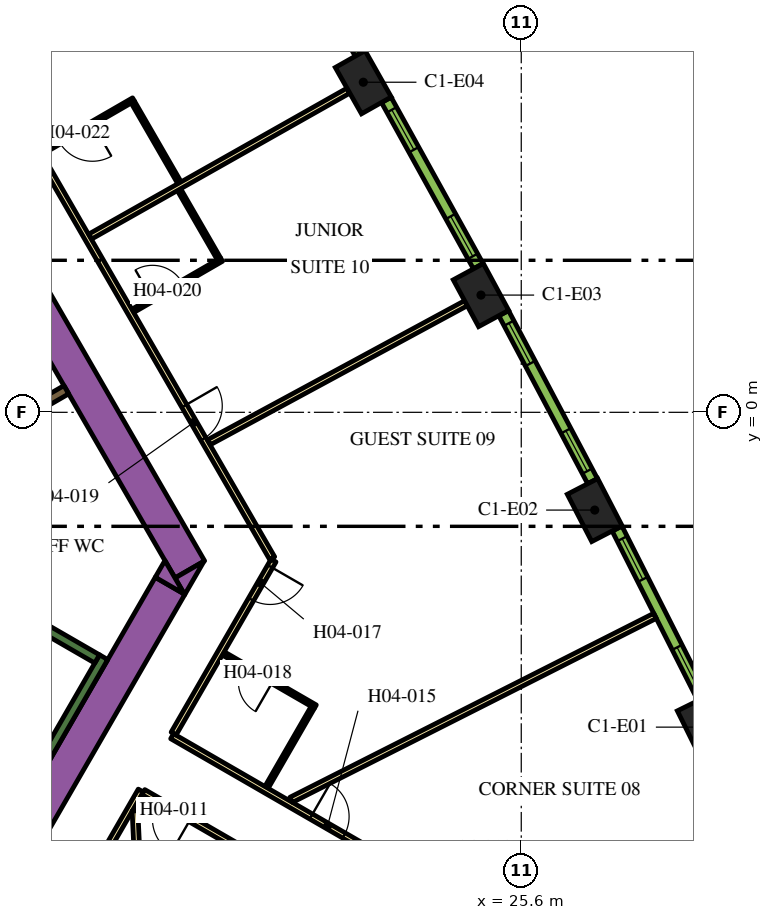
"""IFC4 building model, lengths in metres.
Left out: names, types, materials, properties, quantities, classifications, styles, units other than length and angle.
Written with IfcOpenShell. Run it as: python <this file> out.ifc"""

import sys

from ifc_helpers import new_model, si_unit, direction, frame, frame_2d, origin, origin_2d, place, context, subcontext, project, spatial, polyline, rectangle, outline, extrude, element, fill, save


model = new_model("IFC4")
c1 = context("Model", 3, precision=1e-05, world=origin(), true_north=direction((0.0, 1.0)))
c2 = subcontext(c1, "Body", "Model", "MODEL_VIEW")
j1 = project(units=[si_unit("LENGTHUNIT", "METRE"), si_unit("PLANEANGLEUNIT", "RADIAN")], contexts=[c1])
p1 = place(None, origin())
s1 = spatial("IfcSite", under=j1, at=p1, CompositionType="ELEMENT")
p2 = place(p1, origin())
s2 = spatial("IfcBuilding", under=s1, at=p2, CompositionType="ELEMENT")
p3 = place(p2, frame((0.0, 0.0, 66.6)))
s3 = spatial("IfcBuildingStorey", under=s2, at=p3, CompositionType="ELEMENT", Elevation=66.6)
for number, where, z_axis, x_axis in (
    (1, (30.421, -8.284, 0.0), (0.0, 0.0, 1.0), (-0.443, 0.897, 0.0)),
    (2, (27.533, -2.572, 0.0), (0.0, 0.0, 1.0), (-0.459, 0.888, 0.0)),
    (3, (24.54, 3.085, 0.0), (0.0, 0.0, 1.0), (-0.476, 0.88, 0.0)),
    (4, (21.443, 8.685, 0.0), (0.0, 0.0, 1.0), (-0.492, 0.871, 0.0)),
):
    element("IfcColumn", number, at=place(p3, frame(where, z_axis=z_axis, x_axis=x_axis)), inside=s3, PredefinedType="COLUMN", context=c2, shape_type="SweptSolid", body=[
        extrude(rectangle(XDim=1.4, YDim=0.9, at=origin_2d()), origin(), (0.0, 0.0, 1.0), 3.9),
    ])
p4 = place(p3, frame((6.461, 13.909, 0.0), z_axis=(0.0, 0.0, 1.0), x_axis=(0.500005804227, -0.866022052686, 0.0)))
e5 = element("IfcWall", 5, at=p4, inside=s3, PredefinedType="SOLIDWALL", context=c2, shape_type="SweptSolid", body=[
    extrude(rectangle(XDim=20.834, YDim=0.9, at=frame_2d((10.417, 0.0))), origin(), (0.0, 0.0, 1.0), 3.9),
])
p5 = place(p3, origin())
e6 = element("IfcWall", 6, at=p5, inside=s3, PredefinedType="SOLIDWALL", context=c2, shape_type="SweptSolid", body=[
    extrude(outline(polyline([(16.743, -4.8), (16.489, -4.36), (17.251, -3.92), (16.743, -4.8)])), origin(), (0.0, 0.0, 1.0), 3.9),
])
p6 = place(p3, frame((11.695, -12.644, 0.0), z_axis=(0.0, 0.0, 1.0), x_axis=(0.500010229568, 0.86601949766, 0.0)))
e7 = element("IfcWall", 7, at=p6, inside=s3, PredefinedType="SOLIDWALL", context=c2, shape_type="SweptSolid", body=[
    extrude(rectangle(XDim=9.326, YDim=0.9, at=frame_2d((4.663, 0.0))), origin(), (0.0, 0.0, 1.0), 3.9),
])
e8 = element("IfcWall", 8, at=p5, inside=s3, PredefinedType="SOLIDWALL", context=c2, shape_type="SweptSolid", body=[
    extrude(outline(polyline([(16.223, -3.9), (16.732, -4.78), (15.969, -4.34), (16.223, -3.9)])), origin(), (0.0, 0.0, 1.0), 3.9),
])
p7 = place(p3, frame((12.885, -9.431, 0.0), z_axis=(0.0, 0.0, 1.0), x_axis=(0.500020560727, 0.866013532718, 0.0)))
e9 = element("IfcWall", 9, at=p7, inside=s3, PredefinedType="SOLIDWALL", context=c2, shape_type="SweptSolid", body=[
    extrude(rectangle(XDim=3.45, YDim=0.25, at=frame_2d((1.725, 0.0))), origin(), (0.0, 0.0, 1.0), 3.9),
])
p8 = place(p3, frame((8.334, -2.964, 0.0), z_axis=(0.0, 0.0, 1.0), x_axis=(0.866016039709, -0.500016218704, 0.0)))
e10 = element("IfcWall", 10, at=p8, inside=s3, PredefinedType="SOLIDWALL", context=c2, shape_type="SweptSolid", body=[
    extrude(rectangle(XDim=7.05, YDim=0.25, at=frame_2d((3.525, 0.0))), origin(), (0.0, 0.0, 1.0), 3.9),
])
p9 = place(p3, frame((13.629, 0.594, 0.0), z_axis=(0.0, 0.0, 1.0), x_axis=(-0.86602790099, -0.499995674689, 0.0)))
e11 = element("IfcWall", 11, at=p9, inside=s3, PredefinedType="SOLIDWALL", context=c2, shape_type="SweptSolid", body=[
    extrude(rectangle(XDim=3.146, YDim=0.25, at=frame_2d((1.573, 0.0))), origin(), (0.0, 0.0, 1.0), 3.9),
])
p10 = place(p3, frame((16.412, -8.523, 0.0), z_axis=(0.0, 0.0, 1.0), x_axis=(0.866022197818, -0.500005552856, 0.0)))
e12 = element("IfcWall", 12, at=p10, inside=s3, PredefinedType="PARTITIONING", context=c2, shape_type="SweptSolid", body=[
    extrude(rectangle(XDim=16.224, YDim=0.15, at=frame_2d((8.112, 0.0))), origin(), (0.0, 0.0, 1.0), 2.75),
])
p11 = place(p10, frame((4.223, 0.0, 0.0)))
e13 = element("IfcOpeningElement", 13, at=p11, cuts=e12, PredefinedType="OPENING", context=c2, shape_type="SweptSolid", body=[
    extrude(rectangle(XDim=1.0, YDim=2.1, at=frame_2d((0.5, 1.05))), frame((0.0, 0.085, 0.0), z_axis=(0.0, -1.0, 0.0), x_axis=(1.0, 0.0, 0.0)), (0.0, 0.0, 1.0), 0.17),
])
p12 = place(p3, frame((19.081, -3.9, 0.0), z_axis=(0.0, 0.0, 1.0), x_axis=(-0.499974327079, -0.866040225545, 0.0)))
e14 = element("IfcWall", 14, at=p12, inside=s3, PredefinedType="PARTITIONING", context=c2, shape_type="SweptSolid", body=[
    extrude(rectangle(XDim=5.258, YDim=0.15, at=frame_2d((2.629, 0.0))), origin(), (0.0, 0.0, 1.0), 2.75),
])
p13 = place(p12, frame((0.18, 0.0, 0.0)))
e15 = element("IfcOpeningElement", 15, at=p13, cuts=e14, PredefinedType="OPENING", context=c2, shape_type="SweptSolid", body=[
    extrude(rectangle(XDim=1.0, YDim=2.1, at=frame_2d((0.5, 1.05))), frame((0.0, 0.085, 0.0), z_axis=(0.0, -1.0, 0.0), x_axis=(1.0, 0.0, 0.0)), (0.0, 0.0, 1.0), 0.17),
])
p14 = place(p3, frame((6.163, 18.475, 0.0), z_axis=(0.0, 0.0, 1.0), x_axis=(0.500001317485, -0.866024643133, 0.0)))
e16 = element("IfcWall", 16, at=p14, inside=s3, PredefinedType="PARTITIONING", context=c2, shape_type="SweptSolid", body=[
    extrude(rectangle(XDim=25.767, YDim=0.15, at=frame_2d((12.883, 0.0))), origin(), (0.0, 0.0, 1.0), 2.75),
])
p15 = place(p14, frame((21.138, 0.0, 0.0)))
e17 = element("IfcOpeningElement", 17, at=p15, cuts=e16, PredefinedType="OPENING", context=c2, shape_type="SweptSolid", body=[
    extrude(rectangle(XDim=1.0, YDim=2.1, at=frame_2d((0.5, 1.05))), frame((0.0, 0.085, 0.0), z_axis=(0.0, -1.0, 0.0), x_axis=(1.0, 0.0, 0.0)), (0.0, 0.0, 1.0), 0.17),
])
p16 = place(p14, frame((9.948, 0.0, 0.0)))
e18 = element("IfcOpeningElement", 18, at=p16, cuts=e16, PredefinedType="OPENING", context=c2, shape_type="SweptSolid", body=[
    extrude(rectangle(XDim=1.1, YDim=2.1, at=frame_2d((0.55, 1.05))), frame((0.0, 0.085, 0.0), z_axis=(0.0, -1.0, 0.0), x_axis=(1.0, 0.0, 0.0)), (0.0, 0.0, 1.0), 0.17),
])
p17 = place(p14, frame((8.641, 0.0, 0.0)))
e19 = element("IfcOpeningElement", 19, at=p17, cuts=e16, PredefinedType="OPENING", context=c2, shape_type="SweptSolid", body=[
    extrude(rectangle(XDim=1.0, YDim=2.1, at=frame_2d((0.5, 1.05))), frame((0.0, 0.085, 0.0), z_axis=(0.0, -1.0, 0.0), x_axis=(1.0, 0.0, 0.0)), (0.0, 0.0, 1.0), 0.17),
])
p18 = place(p14, frame((0.18, 0.0, 0.0)))
e20 = element("IfcOpeningElement", 20, at=p18, cuts=e16, PredefinedType="OPENING", context=c2, shape_type="SweptSolid", body=[
    extrude(rectangle(XDim=1.0, YDim=2.1, at=frame_2d((0.5, 1.05))), frame((0.0, 0.085, 0.0), z_axis=(0.0, -1.0, 0.0), x_axis=(1.0, 0.0, 0.0)), (0.0, 0.0, 1.0), 0.17),
])
p19 = place(p3, frame((15.587, -9.952, 0.0), z_axis=(0.0, 0.0, 1.0), x_axis=(-0.500016618951, -0.866015808616, 0.0)))
e21 = element("IfcWall", 21, at=p19, inside=s3, PredefinedType="PARTITIONING", context=c2, shape_type="SweptSolid", body=[
    extrude(rectangle(XDim=5.268, YDim=0.15, at=frame_2d((2.634, 0.0))), origin(), (0.0, 0.0, 1.0), 2.75),
])
p20 = place(p3, frame((29.638, -18.064, 0.0), z_axis=(0.0, 0.0, 1.0), x_axis=(-0.866026175601, 0.499998663172, 0.0)))
e22 = element("IfcWall", 22, at=p20, inside=s3, PredefinedType="PARTITIONING", context=c2, shape_type="SweptSolid", body=[
    extrude(rectangle(XDim=16.144, YDim=0.15, at=frame_2d((8.072, 0.0))), origin(), (0.0, 0.0, 1.0), 2.75),
])
p21 = place(p20, frame((14.714, 0.0, 0.0)))
e23 = element("IfcOpeningElement", 23, at=p21, cuts=e22, PredefinedType="OPENING", context=c2, shape_type="SweptSolid", body=[
    extrude(rectangle(XDim=1.0, YDim=2.1, at=frame_2d((0.5, 1.05))), frame((0.0, 0.085, 0.0), z_axis=(0.0, -1.0, 0.0), x_axis=(1.0, 0.0, 0.0)), (0.0, 0.0, 1.0), 0.17),
])
p22 = place(p20, frame((7.275, 0.0, 0.0)))
e24 = element("IfcOpeningElement", 24, at=p22, cuts=e22, PredefinedType="OPENING", context=c2, shape_type="SweptSolid", body=[
    extrude(rectangle(XDim=1.0, YDim=2.1, at=frame_2d((0.5, 1.05))), frame((0.0, 0.085, 0.0), z_axis=(0.0, -1.0, 0.0), x_axis=(1.0, 0.0, 0.0)), (0.0, 0.0, 1.0), 0.17),
])
p23 = place(p3, frame((21.052, 8.464, 0.0), z_axis=(0.0, 0.0, 1.0), x_axis=(-0.87059371954, -0.492002617368, 0.0)))
e25 = element("IfcWall", 25, at=p23, inside=s3, PredefinedType="PARTITIONING", context=c2, shape_type="SweptSolid", body=[
    extrude(rectangle(XDim=7.803, YDim=0.15, at=frame_2d((3.902, 0.0))), origin(), (0.0, 0.0, 1.0), 2.75),
])
p24 = place(p3, frame((15.973, -22.109, 0.0), z_axis=(0.0, 0.0, 1.0), x_axis=(-0.046191717129, 0.998932592955, 0.0)))
e26 = element("IfcWall", 26, at=p24, inside=s3, PredefinedType="PARTITIONING", context=c2, shape_type="SweptSolid", body=[
    extrude(rectangle(XDim=11.638, YDim=0.15, at=frame_2d((5.819, 0.0))), origin(), (0.0, 0.0, 1.0), 2.75),
])
p25 = place(p3, frame((24.145, 2.871, 0.0), z_axis=(0.0, 0.0, 1.0), x_axis=(-0.879551725039, -0.475803281809, 0.0)))
e27 = element("IfcWall", 27, at=p25, inside=s3, PredefinedType="PARTITIONING", context=c2, shape_type="SweptSolid", body=[
    extrude(rectangle(XDim=7.688, YDim=0.15, at=frame_2d((3.844, 0.0))), origin(), (0.0, 0.0, 1.0), 2.75),
])
p26 = place(p3, frame((29.12, -5.356, 0.0), z_axis=(0.0, 0.0, 1.0), x_axis=(-0.892401965553, -0.451241323327, 0.0)))
e28 = element("IfcWall", 28, at=p26, inside=s3, PredefinedType="PARTITIONING", context=c2, shape_type="SweptSolid", body=[
    extrude(rectangle(XDim=10.729, YDim=0.15, at=frame_2d((5.364, 0.0))), origin(), (0.0, 0.0, 1.0), 2.75),
])
p27 = place(p3, frame((20.182, -7.743, 0.0), z_axis=(0.0, 0.0, 1.0), x_axis=(-0.866034573852, 0.49998411664, 0.0)))
e29 = element("IfcWall", 29, at=p27, inside=s3, PredefinedType="PARTITIONING", context=c2, shape_type="SweptSolid", body=[
    extrude(rectangle(XDim=2.8, YDim=0.1, at=frame_2d((1.4, 0.0))), origin(), (0.0, 0.0, 1.0), 2.75),
])
p28 = place(p27, frame((1.3, 0.0, 0.0)))
e30 = element("IfcOpeningElement", 30, at=p28, cuts=e29, PredefinedType="OPENING", context=c2, shape_type="SweptSolid", body=[
    extrude(rectangle(XDim=0.9, YDim=2.1, at=frame_2d((0.45, 1.05))), frame((0.0, 0.06, 0.0), z_axis=(0.0, -1.0, 0.0), x_axis=(1.0, 0.0, 0.0)), (0.0, 0.0, 1.0), 0.12),
])
p29 = place(p3, frame((20.109, -7.771, 0.0), z_axis=(0.0, 0.0, 1.0), x_axis=(-0.500077573772, -0.865980611914, 0.0)))
e31 = element("IfcWall", 31, at=p29, inside=s3, PredefinedType="PARTITIONING", context=c2, shape_type="SweptSolid", body=[
    extrude(rectangle(XDim=2.42, YDim=0.1, at=frame_2d((1.21, 0.0))), origin(), (0.0, 0.0, 1.0), 2.75),
])
p30 = place(p3, frame((15.376, 2.668, 0.0), z_axis=(0.0, 0.0, 1.0), x_axis=(0.866036505625, 0.499980770555, 0.0)))
e32 = element("IfcWall", 32, at=p30, inside=s3, PredefinedType="PARTITIONING", context=c2, shape_type="SweptSolid", body=[
    extrude(rectangle(XDim=2.7, YDim=0.1, at=frame_2d((1.35, 0.0))), origin(), (0.0, 0.0, 1.0), 2.75),
])
p31 = place(p30, frame((0.6, 0.0, 0.0)))
e33 = element("IfcOpeningElement", 33, at=p31, cuts=e32, PredefinedType="OPENING", context=c2, shape_type="SweptSolid", body=[
    extrude(rectangle(XDim=0.9, YDim=2.1, at=frame_2d((0.45, 1.05))), frame((0.0, 0.06, 0.0), z_axis=(0.0, -1.0, 0.0), x_axis=(1.0, 0.0, 0.0)), (0.0, 0.0, 1.0), 0.12),
])
p32 = place(p3, frame((17.646, 4.036, 0.0), z_axis=(0.0, 0.0, 1.0), x_axis=(-0.500027713859, 0.866009402589, 0.0)))
e34 = element("IfcWall", 34, at=p32, inside=s3, PredefinedType="PARTITIONING", context=c2, shape_type="SweptSolid", body=[
    extrude(rectangle(XDim=2.1, YDim=0.1, at=frame_2d((1.05, 0.0))), origin(), (0.0, 0.0, 1.0), 2.75),
])
p33 = place(p3, frame((15.397, 8.231, 0.0), z_axis=(0.0, 0.0, 1.0), x_axis=(-0.866018616679, -0.500011755427, 0.0)))
e35 = element("IfcWall", 35, at=p33, inside=s3, PredefinedType="PARTITIONING", context=c2, shape_type="SweptSolid", body=[
    extrude(rectangle(XDim=2.8, YDim=0.1, at=frame_2d((1.4, 0.0))), origin(), (0.0, 0.0, 1.0), 2.75),
])
p34 = place(p33, frame((1.25, 0.0, 0.0)))
e36 = element("IfcOpeningElement", 36, at=p34, cuts=e35, PredefinedType="OPENING", context=c2, shape_type="SweptSolid", body=[
    extrude(rectangle(XDim=1.0, YDim=2.1, at=frame_2d((0.5, 1.05))), frame((0.0, 0.06, 0.0), z_axis=(0.0, -1.0, 0.0), x_axis=(1.0, 0.0, 0.0)), (0.0, 0.0, 1.0), 0.12),
])
p35 = place(p3, frame((15.379, 8.163, 0.0), z_axis=(0.0, 0.0, 1.0), x_axis=(0.499987006516, -0.866032905446, 0.0)))
e37 = element("IfcWall", 37, at=p35, inside=s3, PredefinedType="PARTITIONING", context=c2, shape_type="SweptSolid", body=[
    extrude(rectangle(XDim=2.45, YDim=0.1, at=frame_2d((1.225, 0.0))), origin(), (0.0, 0.0, 1.0), 2.75),
])
p36 = place(p3, frame((30.377, -7.521, 0.0), z_axis=(0.0, 0.0, 1.0), x_axis=(-0.451233929645, 0.892405704115, 0.0)))
e38 = element("IfcWall", 38, at=p36, inside=s3, PredefinedType="SOLIDWALL", context=c2, shape_type="SweptSolid", body=[
    extrude(rectangle(XDim=4.998, YDim=0.29, at=frame_2d((2.499, 0.0))), origin(), (0.0, 0.0, 1.0), 3.65),
])
p37 = place(p36, frame((0.297, 0.0, 0.9)))
e39 = element("IfcOpeningElement", 39, at=p37, cuts=e38, PredefinedType="OPENING", context=c2, shape_type="SweptSolid", body=[
    extrude(rectangle(XDim=1.2, YDim=2.15, at=frame_2d((0.6, 1.075))), frame((0.0, 0.155, 0.0), z_axis=(0.0, -1.0, 0.0), x_axis=(1.0, 0.0, 0.0)), (0.0, 0.0, 1.0), 0.31),
])
p38 = place(p36, frame((3.501, 0.0, 0.9)))
e40 = element("IfcOpeningElement", 40, at=p38, cuts=e38, PredefinedType="OPENING", context=c2, shape_type="SweptSolid", body=[
    extrude(rectangle(XDim=1.2, YDim=2.15, at=frame_2d((0.6, 1.075))), frame((0.0, 0.155, 0.0), z_axis=(0.0, -1.0, 0.0), x_axis=(1.0, 0.0, 0.0)), (0.0, 0.0, 1.0), 0.31),
])
p39 = place(p3, frame((27.475, -1.81, 0.0), z_axis=(0.0, 0.0, 1.0), x_axis=(-0.467629620899, 0.883924509026, 0.0)))
e41 = element("IfcWall", 41, at=p39, inside=s3, PredefinedType="SOLIDWALL", context=c2, shape_type="SweptSolid", body=[
    extrude(rectangle(XDim=4.998, YDim=0.29, at=frame_2d((2.499, 0.0))), origin(), (0.0, 0.0, 1.0), 3.65),
])
p40 = place(p39, frame((0.297, 0.0, 0.9)))
e42 = element("IfcOpeningElement", 42, at=p40, cuts=e41, PredefinedType="OPENING", context=c2, shape_type="SweptSolid", body=[
    extrude(rectangle(XDim=1.2, YDim=2.15, at=frame_2d((0.6, 1.075))), frame((0.0, 0.155, 0.0), z_axis=(0.0, -1.0, 0.0), x_axis=(1.0, 0.0, 0.0)), (0.0, 0.0, 1.0), 0.31),
])
p41 = place(p39, frame((3.501, 0.0, 0.9)))
e43 = element("IfcOpeningElement", 43, at=p41, cuts=e41, PredefinedType="OPENING", context=c2, shape_type="SweptSolid", body=[
    extrude(rectangle(XDim=1.2, YDim=2.15, at=frame_2d((0.6, 1.075))), frame((0.0, 0.155, 0.0), z_axis=(0.0, -1.0, 0.0), x_axis=(1.0, 0.0, 0.0)), (0.0, 0.0, 1.0), 0.31),
])
p42 = place(p3, frame((24.468, 3.846, 0.0), z_axis=(0.0, 0.0, 1.0), x_axis=(-0.483912572871, 0.875116347589, 0.0)))
e44 = element("IfcWall", 44, at=p42, inside=s3, PredefinedType="SOLIDWALL", context=c2, shape_type="SweptSolid", body=[
    extrude(rectangle(XDim=4.998, YDim=0.29, at=frame_2d((2.499, 0.0))), origin(), (0.0, 0.0, 1.0), 3.65),
])
p43 = place(p42, frame((0.297, 0.0, 0.9)))
e45 = element("IfcOpeningElement", 45, at=p43, cuts=e44, PredefinedType="OPENING", context=c2, shape_type="SweptSolid", body=[
    extrude(rectangle(XDim=1.2, YDim=2.15, at=frame_2d((0.6, 1.075))), frame((0.0, 0.155, 0.0), z_axis=(0.0, -1.0, 0.0), x_axis=(1.0, 0.0, 0.0)), (0.0, 0.0, 1.0), 0.31),
])
p44 = place(p42, frame((3.501, 0.0, 0.9)))
e46 = element("IfcOpeningElement", 46, at=p44, cuts=e44, PredefinedType="OPENING", context=c2, shape_type="SweptSolid", body=[
    extrude(rectangle(XDim=1.2, YDim=2.15, at=frame_2d((0.6, 1.075))), frame((0.0, 0.155, 0.0), z_axis=(0.0, -1.0, 0.0), x_axis=(1.0, 0.0, 0.0)), (0.0, 0.0, 1.0), 0.31),
])
p45 = place(p3, frame((21.357, 9.445, 0.0), z_axis=(0.0, 0.0, 1.0), x_axis=(-0.50002123722, 0.866013142123, 0.0)))
e47 = element("IfcWall", 47, at=p45, inside=s3, PredefinedType="SOLIDWALL", context=c2, shape_type="SweptSolid", body=[
    extrude(rectangle(XDim=4.998, YDim=0.29, at=frame_2d((2.499, 0.0))), origin(), (0.0, 0.0, 1.0), 3.65),
])
p46 = place(p45, frame((0.297, 0.0, 0.9)))
e48 = element("IfcOpeningElement", 48, at=p46, cuts=e47, PredefinedType="OPENING", context=c2, shape_type="SweptSolid", body=[
    extrude(rectangle(XDim=1.2, YDim=2.15, at=frame_2d((0.6, 1.075))), frame((0.0, 0.155, 0.0), z_axis=(0.0, -1.0, 0.0), x_axis=(1.0, 0.0, 0.0)), (0.0, 0.0, 1.0), 0.31),
])
p47 = place(p45, frame((3.501, 0.0, 0.9)))
e49 = element("IfcOpeningElement", 49, at=p47, cuts=e47, PredefinedType="OPENING", context=c2, shape_type="SweptSolid", body=[
    extrude(rectangle(XDim=1.2, YDim=2.15, at=frame_2d((0.6, 1.075))), frame((0.0, 0.155, 0.0), z_axis=(0.0, -1.0, 0.0), x_axis=(1.0, 0.0, 0.0)), (0.0, 0.0, 1.0), 0.31),
])
p48 = place(p21, origin())
e50 = element("IfcDoor", 50, at=p48, inside=s3, OperationType="SINGLE_SWING_RIGHT", PredefinedType="DOOR", context=c2, shape_type="SweptSolid", body=[
    extrude(rectangle(XDim=1.0, YDim=2.1, at=frame_2d((0.5, 1.05))), frame((0.0, 0.025, 0.0), z_axis=(0.0, -1.0, 0.0), x_axis=(1.0, 0.0, 0.0)), (0.0, 0.0, 1.0), 0.05),
])
fill(e23, e50)
p49 = place(p11, origin())
e51 = element("IfcDoor", 51, at=p49, inside=s3, OperationType="SINGLE_SWING_LEFT", PredefinedType="DOOR", context=c2, shape_type="SweptSolid", body=[
    extrude(rectangle(XDim=1.0, YDim=2.1, at=frame_2d((0.5, 1.05))), frame((0.0, 0.025, 0.0), z_axis=(0.0, -1.0, 0.0), x_axis=(1.0, 0.0, 0.0)), (0.0, 0.0, 1.0), 0.05),
])
fill(e13, e51)
p50 = place(p13, origin())
e52 = element("IfcDoor", 52, at=p50, inside=s3, OperationType="SINGLE_SWING_LEFT", PredefinedType="DOOR", context=c2, shape_type="SweptSolid", body=[
    extrude(rectangle(XDim=1.0, YDim=2.1, at=frame_2d((0.5, 1.05))), frame((0.0, 0.025, 0.0), z_axis=(0.0, -1.0, 0.0), x_axis=(1.0, 0.0, 0.0)), (0.0, 0.0, 1.0), 0.05),
])
fill(e15, e52)
p51 = place(p28, origin())
e53 = element("IfcDoor", 53, at=p51, inside=s3, OperationType="SINGLE_SWING_RIGHT", PredefinedType="DOOR", context=c2, shape_type="SweptSolid", body=[
    extrude(rectangle(XDim=0.9, YDim=2.1, at=frame_2d((0.45, 1.05))), frame((0.0, 0.025, 0.0), z_axis=(0.0, -1.0, 0.0), x_axis=(1.0, 0.0, 0.0)), (0.0, 0.0, 1.0), 0.05),
])
fill(e30, e53)
p52 = place(p15, origin())
e54 = element("IfcDoor", 54, at=p52, inside=s3, OperationType="SINGLE_SWING_RIGHT", PredefinedType="DOOR", context=c2, shape_type="SweptSolid", body=[
    extrude(rectangle(XDim=1.0, YDim=2.1, at=frame_2d((0.5, 1.05))), frame((0.0, 0.025, 0.0), z_axis=(0.0, -1.0, 0.0), x_axis=(1.0, 0.0, 0.0)), (0.0, 0.0, 1.0), 0.05),
])
fill(e17, e54)
p53 = place(p31, origin())
e55 = element("IfcDoor", 55, at=p53, inside=s3, OperationType="SINGLE_SWING_LEFT", PredefinedType="DOOR", context=c2, shape_type="SweptSolid", body=[
    extrude(rectangle(XDim=0.9, YDim=2.1, at=frame_2d((0.45, 1.05))), frame((0.0, 0.025, 0.0), z_axis=(0.0, -1.0, 0.0), x_axis=(1.0, 0.0, 0.0)), (0.0, 0.0, 1.0), 0.05),
])
fill(e33, e55)
p54 = place(p34, origin())
e56 = element("IfcDoor", 56, at=p54, inside=s3, OperationType="SINGLE_SWING_LEFT", PredefinedType="DOOR", context=c2, shape_type="SweptSolid", body=[
    extrude(rectangle(XDim=1.0, YDim=2.1, at=frame_2d((0.5, 1.05))), frame((0.0, 0.025, 0.0), z_axis=(0.0, -1.0, 0.0), x_axis=(1.0, 0.0, 0.0)), (0.0, 0.0, 1.0), 0.05),
])
fill(e36, e56)
p55 = place(p37, origin())
e57 = element("IfcWindow", 57, at=p55, inside=s3, PartitioningType="DOUBLE_PANEL_VERTICAL", PredefinedType="WINDOW", context=c2, shape_type="SweptSolid", body=[
    extrude(rectangle(XDim=1.2, YDim=2.15, at=frame_2d((0.6, 1.075))), frame((0.0, 0.015, 0.0), z_axis=(0.0, -1.0, 0.0), x_axis=(1.0, 0.0, 0.0)), (0.0, 0.0, 1.0), 0.06),
])
fill(e39, e57)
p56 = place(p38, origin())
e58 = element("IfcWindow", 58, at=p56, inside=s3, PartitioningType="DOUBLE_PANEL_VERTICAL", PredefinedType="WINDOW", context=c2, shape_type="SweptSolid", body=[
    extrude(rectangle(XDim=1.2, YDim=2.15, at=frame_2d((0.6, 1.075))), frame((0.0, 0.015, 0.0), z_axis=(0.0, -1.0, 0.0), x_axis=(1.0, 0.0, 0.0)), (0.0, 0.0, 1.0), 0.06),
])
fill(e40, e58)
p57 = place(p40, origin())
e59 = element("IfcWindow", 59, at=p57, inside=s3, PartitioningType="DOUBLE_PANEL_VERTICAL", PredefinedType="WINDOW", context=c2, shape_type="SweptSolid", body=[
    extrude(rectangle(XDim=1.2, YDim=2.15, at=frame_2d((0.6, 1.075))), frame((0.0, 0.015, 0.0), z_axis=(0.0, -1.0, 0.0), x_axis=(1.0, 0.0, 0.0)), (0.0, 0.0, 1.0), 0.06),
])
fill(e42, e59)
p58 = place(p41, origin())
e60 = element("IfcWindow", 60, at=p58, inside=s3, PartitioningType="DOUBLE_PANEL_VERTICAL", PredefinedType="WINDOW", context=c2, shape_type="SweptSolid", body=[
    extrude(rectangle(XDim=1.2, YDim=2.15, at=frame_2d((0.6, 1.075))), frame((0.0, 0.015, 0.0), z_axis=(0.0, -1.0, 0.0), x_axis=(1.0, 0.0, 0.0)), (0.0, 0.0, 1.0), 0.06),
])
fill(e43, e60)
p59 = place(p43, origin())
e61 = element("IfcWindow", 61, at=p59, inside=s3, PartitioningType="DOUBLE_PANEL_VERTICAL", PredefinedType="WINDOW", context=c2, shape_type="SweptSolid", body=[
    extrude(rectangle(XDim=1.2, YDim=2.15, at=frame_2d((0.6, 1.075))), frame((0.0, 0.015, 0.0), z_axis=(0.0, -1.0, 0.0), x_axis=(1.0, 0.0, 0.0)), (0.0, 0.0, 1.0), 0.06),
])
fill(e45, e61)
p60 = place(p44, origin())
e62 = element("IfcWindow", 62, at=p60, inside=s3, PartitioningType="DOUBLE_PANEL_VERTICAL", PredefinedType="WINDOW", context=c2, shape_type="SweptSolid", body=[
    extrude(rectangle(XDim=1.2, YDim=2.15, at=frame_2d((0.6, 1.075))), frame((0.0, 0.015, 0.0), z_axis=(0.0, -1.0, 0.0), x_axis=(1.0, 0.0, 0.0)), (0.0, 0.0, 1.0), 0.06),
])
fill(e46, e62)
save(model, sys.argv[1])
